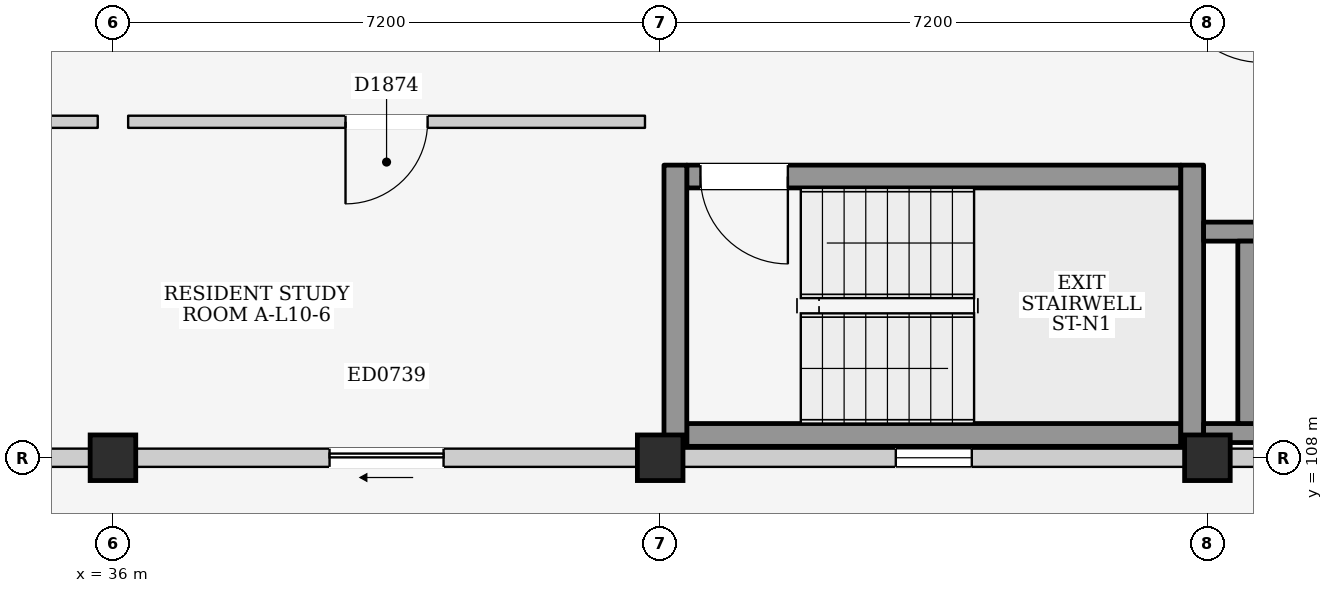
"""IFC4 building model, lengths in metres.
Left out: names, types, materials, properties, quantities, classifications, styles, units other than length and angle.
Written with IfcOpenShell. Run it as: python <this file> out.ifc"""

import sys

from ifc_helpers import new_model, si_unit, direction, frame, frame_2d, origin, origin_2d, place, context, subcontext, project, spatial, rectangle, extrude, element, fill, save


model = new_model("IFC4")
c1 = context("Model", 3, precision=1e-05, world=origin(), true_north=direction((0.0, 1.0)))
c2 = subcontext(c1, "Body", "Model", "MODEL_VIEW")
j1 = project(units=[si_unit("LENGTHUNIT", "METRE"), si_unit("PLANEANGLEUNIT", "RADIAN")], contexts=[c1])
p1 = place(None, origin())
s1 = spatial("IfcSite", under=j1, at=p1, CompositionType="ELEMENT")
p2 = place(p1, origin())
s2 = spatial("IfcBuilding", under=s1, at=p2, CompositionType="ELEMENT")
p3 = place(p2, frame((0.0, 0.0, 34.8)))
s3 = spatial("IfcBuildingStorey", under=s2, at=p3, CompositionType="ELEMENT", Elevation=34.8)
for number, where, z_axis, x_axis in (
    (1, (36.0, 108.0, 0.0), (0.0, 0.0, 1.0), (1.0, 0.0, 0.0)),
    (2, (43.2, 108.0, 0.0), (0.0, 0.0, 1.0), (1.0, 0.0, 0.0)),
    (3, (50.4, 108.0, 0.0), (0.0, 0.0, 1.0), (1.0, 0.0, 0.0)),
):
    element("IfcColumn", number, at=place(p3, frame(where, z_axis=z_axis, x_axis=x_axis)), inside=s3, PredefinedType="COLUMN", context=c2, shape_type="SweptSolid", body=[
        extrude(rectangle(XDim=0.6, YDim=0.6, at=origin_2d()), origin(), (0.0, 0.0, 1.0), 3.2),
    ])
p4 = place(p3, frame((29.1, 108.0, 0.0), z_axis=(0.0, 0.0, 1.0), x_axis=(1.0, 0.0, 0.0)))
e4 = element("IfcWall", 4, at=p4, inside=s3, PredefinedType="ELEMENTEDWALL", context=c2, shape_type="SweptSolid", body=[
    extrude(rectangle(XDim=6.6, YDim=0.24, at=frame_2d((3.3, 0.0))), origin(), (0.0, 0.0, 1.0), 2.295),
])
p5 = place(p4, frame((2.55, 0.0, 0.0)))
e5 = element("IfcOpeningElement", 5, at=p5, cuts=e4, PredefinedType="OPENING", context=c2, shape_type="SweptSolid", body=[
    extrude(rectangle(XDim=1.5, YDim=2.12, at=frame_2d((0.75, 1.06))), frame((0.0, 0.135, 0.0), z_axis=(0.0, -1.0, 0.0), x_axis=(1.0, 0.0, 0.0)), (0.0, 0.0, 1.0), 0.27),
])
p6 = place(p3, frame((36.3, 108.0, 0.0), z_axis=(0.0, 0.0, 1.0), x_axis=(1.0, 0.0, 0.0)))
e6 = element("IfcWall", 6, at=p6, inside=s3, PredefinedType="ELEMENTEDWALL", context=c2, shape_type="SweptSolid", body=[
    extrude(rectangle(XDim=6.6, YDim=0.24, at=frame_2d((3.3, 0.0))), origin(), (0.0, 0.0, 1.0), 2.295),
])
p7 = place(p6, frame((2.55, 0.0, 0.0)))
e7 = element("IfcOpeningElement", 7, at=p7, cuts=e6, PredefinedType="OPENING", context=c2, shape_type="SweptSolid", body=[
    extrude(rectangle(XDim=1.5, YDim=2.12, at=frame_2d((0.75, 1.06))), frame((0.0, 0.135, 0.0), z_axis=(0.0, -1.0, 0.0), x_axis=(1.0, 0.0, 0.0)), (0.0, 0.0, 1.0), 0.27),
])
p8 = place(p3, frame((43.5, 108.0, 0.0), z_axis=(0.0, 0.0, 1.0), x_axis=(1.0, 0.0, 0.0)))
e8 = element("IfcWall", 8, at=p8, inside=s3, PredefinedType="ELEMENTEDWALL", context=c2, shape_type="SweptSolid", body=[
    extrude(rectangle(XDim=6.6, YDim=0.24, at=frame_2d((3.3, 0.0))), origin(), (0.0, 0.0, 1.0), 2.295),
])
p9 = place(p8, frame((2.8, 0.0, 1.2)))
e9 = element("IfcOpeningElement", 9, at=p9, cuts=e8, PredefinedType="OPENING", context=c2, shape_type="SweptSolid", body=[
    extrude(rectangle(XDim=1.0, YDim=0.9, at=frame_2d((0.5, 0.45))), frame((0.0, 0.135, 0.0), z_axis=(0.0, -1.0, 0.0), x_axis=(1.0, 0.0, 0.0)), (0.0, 0.0, 1.0), 0.27),
])
p10 = place(p3, frame((50.7, 108.0, 0.0), z_axis=(0.0, 0.0, 1.0), x_axis=(1.0, 0.0, 0.0)))
e10 = element("IfcWall", 10, at=p10, inside=s3, PredefinedType="ELEMENTEDWALL", context=c2, shape_type="SweptSolid", body=[
    extrude(rectangle(XDim=6.6, YDim=0.24, at=frame_2d((3.3, 0.0))), origin(), (0.0, 0.0, 1.0), 2.295),
])
p11 = place(p10, frame((2.8, 0.0, 1.2)))
e11 = element("IfcOpeningElement", 11, at=p11, cuts=e10, PredefinedType="OPENING", context=c2, shape_type="SweptSolid", body=[
    extrude(rectangle(XDim=1.0, YDim=0.9, at=frame_2d((0.5, 0.45))), frame((0.0, 0.135, 0.0), z_axis=(0.0, -1.0, 0.0), x_axis=(1.0, 0.0, 0.0)), (0.0, 0.0, 1.0), 0.27),
])
p12 = place(p3, frame((43.55, 108.3, 0.0), z_axis=(0.0, 0.0, 1.0), x_axis=(1.0, 0.0, 0.0)))
e12 = element("IfcWall", 12, at=p12, inside=s3, PredefinedType="SHEAR", context=c2, shape_type="SweptSolid", body=[
    extrude(rectangle(XDim=6.5, YDim=0.3, at=frame_2d((3.25, 0.0))), origin(), (0.0, 0.0, 1.0), 2.96),
])
p13 = place(p3, frame((43.55, 111.7, 0.0), z_axis=(0.0, 0.0, 1.0), x_axis=(1.0, 0.0, 0.0)))
e13 = element("IfcWall", 13, at=p13, inside=s3, PredefinedType="SHEAR", context=c2, shape_type="SweptSolid", body=[
    extrude(rectangle(XDim=6.5, YDim=0.3, at=frame_2d((3.25, 0.0))), origin(), (0.0, 0.0, 1.0), 2.96),
])
p14 = place(p13, frame((0.18, 0.0, 0.0)))
e14 = element("IfcOpeningElement", 14, at=p14, cuts=e13, PredefinedType="OPENING", context=c2, shape_type="SweptSolid", body=[
    extrude(rectangle(XDim=1.15, YDim=2.2, at=frame_2d((0.575, 1.1))), frame((0.0, 0.165, 0.0), z_axis=(0.0, -1.0, 0.0), x_axis=(1.0, 0.0, 0.0)), (0.0, 0.0, 1.0), 0.33),
])
for number, where, z_axis, x_axis in (
    (15, (43.4, 108.15, 0.0), (0.0, 0.0, 1.0), (0.0, 1.0, 0.0)),
    (16, (50.2, 108.15, 0.0), (0.0, 0.0, 1.0), (0.0, 1.0, 0.0)),
):
    element("IfcWall", number, at=place(p3, frame(where, z_axis=z_axis, x_axis=x_axis)), inside=s3, PredefinedType="SHEAR", context=c2, shape_type="SweptSolid", body=[
        extrude(rectangle(XDim=3.7, YDim=0.3, at=frame_2d((1.85, 0.0))), origin(), (0.0, 0.0, 1.0), 2.96),
    ])
p15 = place(p3, frame((50.35, 108.325, 0.0), z_axis=(0.0, 0.0, 1.0), x_axis=(1.0, 0.0, 0.0)))
e17 = element("IfcWall", 17, at=p15, inside=s3, PredefinedType="SHEAR", context=c2, shape_type="SweptSolid", body=[
    extrude(rectangle(XDim=2.675, YDim=0.25, at=frame_2d((1.337, 0.0))), origin(), (0.0, 0.0, 1.0), 2.96),
])
p16 = place(p3, frame((50.35, 110.975, 0.0), z_axis=(0.0, 0.0, 1.0), x_axis=(1.0, 0.0, 0.0)))
e18 = element("IfcWall", 18, at=p16, inside=s3, PredefinedType="SHEAR", context=c2, shape_type="SweptSolid", body=[
    extrude(rectangle(XDim=2.675, YDim=0.25, at=frame_2d((1.337, 0.0))), origin(), (0.0, 0.0, 1.0), 2.96),
])
p17 = place(p16, frame((1.0, 0.0, 0.0)))
e19 = element("IfcOpeningElement", 19, at=p17, cuts=e18, PredefinedType="OPENING", context=c2, shape_type="SweptSolid", body=[
    extrude(rectangle(XDim=1.2, YDim=2.25, at=frame_2d((0.6, 1.125))), frame((0.0, 0.14, 0.0), z_axis=(0.0, -1.0, 0.0), x_axis=(1.0, 0.0, 0.0)), (0.0, 0.0, 1.0), 0.28),
])
p18 = place(p3, frame((50.925, 108.45, 0.0), z_axis=(0.0, 0.0, 1.0), x_axis=(0.0, 1.0, 0.0)))
e20 = element("IfcWall", 20, at=p18, inside=s3, PredefinedType="SHEAR", context=c2, shape_type="SweptSolid", body=[
    extrude(rectangle(XDim=2.4, YDim=0.25, at=frame_2d((1.2, 0.0))), origin(), (0.0, 0.0, 1.0), 2.96),
])
p19 = place(p3, frame((29.0, 112.42, 0.0), z_axis=(0.0, 0.0, 1.0), x_axis=(1.0, 0.0, 0.0)))
e21 = element("IfcWall", 21, at=p19, inside=s3, PredefinedType="PARTITIONING", context=c2, shape_type="SweptSolid", body=[
    extrude(rectangle(XDim=6.8, YDim=0.16, at=frame_2d((3.4, 0.0))), origin(), (0.0, 0.0, 1.0), 2.96),
])
p20 = place(p19, frame((2.86, 0.0, 0.0)))
e22 = element("IfcOpeningElement", 22, at=p20, cuts=e21, PredefinedType="OPENING", context=c2, shape_type="SweptSolid", body=[
    extrude(rectangle(XDim=1.08, YDim=2.22, at=frame_2d((0.54, 1.11))), frame((0.0, 0.095, 0.0), z_axis=(0.0, -1.0, 0.0), x_axis=(1.0, 0.0, 0.0)), (0.0, 0.0, 1.0), 0.19),
])
p21 = place(p3, frame((36.2, 112.42, 0.0), z_axis=(0.0, 0.0, 1.0), x_axis=(1.0, 0.0, 0.0)))
e23 = element("IfcWall", 23, at=p21, inside=s3, PredefinedType="PARTITIONING", context=c2, shape_type="SweptSolid", body=[
    extrude(rectangle(XDim=6.8, YDim=0.16, at=frame_2d((3.4, 0.0))), origin(), (0.0, 0.0, 1.0), 2.96),
])
p22 = place(p21, frame((2.86, 0.0, 0.0)))
e24 = element("IfcOpeningElement", 24, at=p22, cuts=e23, PredefinedType="OPENING", context=c2, shape_type="SweptSolid", body=[
    extrude(rectangle(XDim=1.08, YDim=2.22, at=frame_2d((0.54, 1.11))), frame((0.0, 0.095, 0.0), z_axis=(0.0, -1.0, 0.0), x_axis=(1.0, 0.0, 0.0)), (0.0, 0.0, 1.0), 0.19),
])
p23 = place(p7, frame((1.5, 0.0, 0.0), z_axis=(0.0, 0.0, 1.0), x_axis=(-1.0, 0.0, 0.0)))
e25 = element("IfcDoor", 25, at=p23, inside=s3, OperationType="SLIDING_TO_LEFT", PredefinedType="DOOR", context=c2, shape_type="SweptSolid", body=[
    extrude(rectangle(XDim=1.5, YDim=2.12, at=frame_2d((0.75, 1.06))), frame((0.0, 0.025, 0.0), z_axis=(0.0, -1.0, 0.0), x_axis=(1.0, 0.0, 0.0)), (0.0, 0.0, 1.0), 0.05),
])
fill(e7, e25)
p24 = place(p9, origin())
e26 = element("IfcWindow", 26, at=p24, inside=s3, PartitioningType="SINGLE_PANEL", PredefinedType="WINDOW", context=c2, shape_type="SweptSolid", body=[
    extrude(rectangle(XDim=1.0, YDim=0.9, at=frame_2d((0.5, 0.45))), frame((0.0, 0.03, 0.0), z_axis=(0.0, -1.0, 0.0), x_axis=(1.0, 0.0, 0.0)), (0.0, 0.0, 1.0), 0.06),
])
fill(e9, e26)
p25 = place(p14, frame((1.15, 0.0, 0.0), z_axis=(0.0, 0.0, 1.0), x_axis=(-1.0, 0.0, 0.0)))
e27 = element("IfcDoor", 27, at=p25, inside=s3, OperationType="SINGLE_SWING_LEFT", PredefinedType="DOOR", context=c2, shape_type="SweptSolid", body=[
    extrude(rectangle(XDim=1.15, YDim=2.2, at=frame_2d((0.575, 1.1))), frame((0.0, 0.025, 0.0), z_axis=(0.0, -1.0, 0.0), x_axis=(1.0, 0.0, 0.0)), (0.0, 0.0, 1.0), 0.05),
])
fill(e14, e27)
p26 = place(p22, frame((1.08, 0.0, 0.0), z_axis=(0.0, 0.0, 1.0), x_axis=(-1.0, 0.0, 0.0)))
e28 = element("IfcDoor", 28, at=p26, inside=s3, OperationType="SINGLE_SWING_RIGHT", PredefinedType="DOOR", context=c2, shape_type="SweptSolid", body=[
    extrude(rectangle(XDim=1.08, YDim=2.22, at=frame_2d((0.54, 1.11))), frame((0.0, 0.025, 0.0), z_axis=(0.0, -1.0, 0.0), x_axis=(1.0, 0.0, 0.0)), (0.0, 0.0, 1.0), 0.05),
])
fill(e24, e28)
save(model, sys.argv[1])
